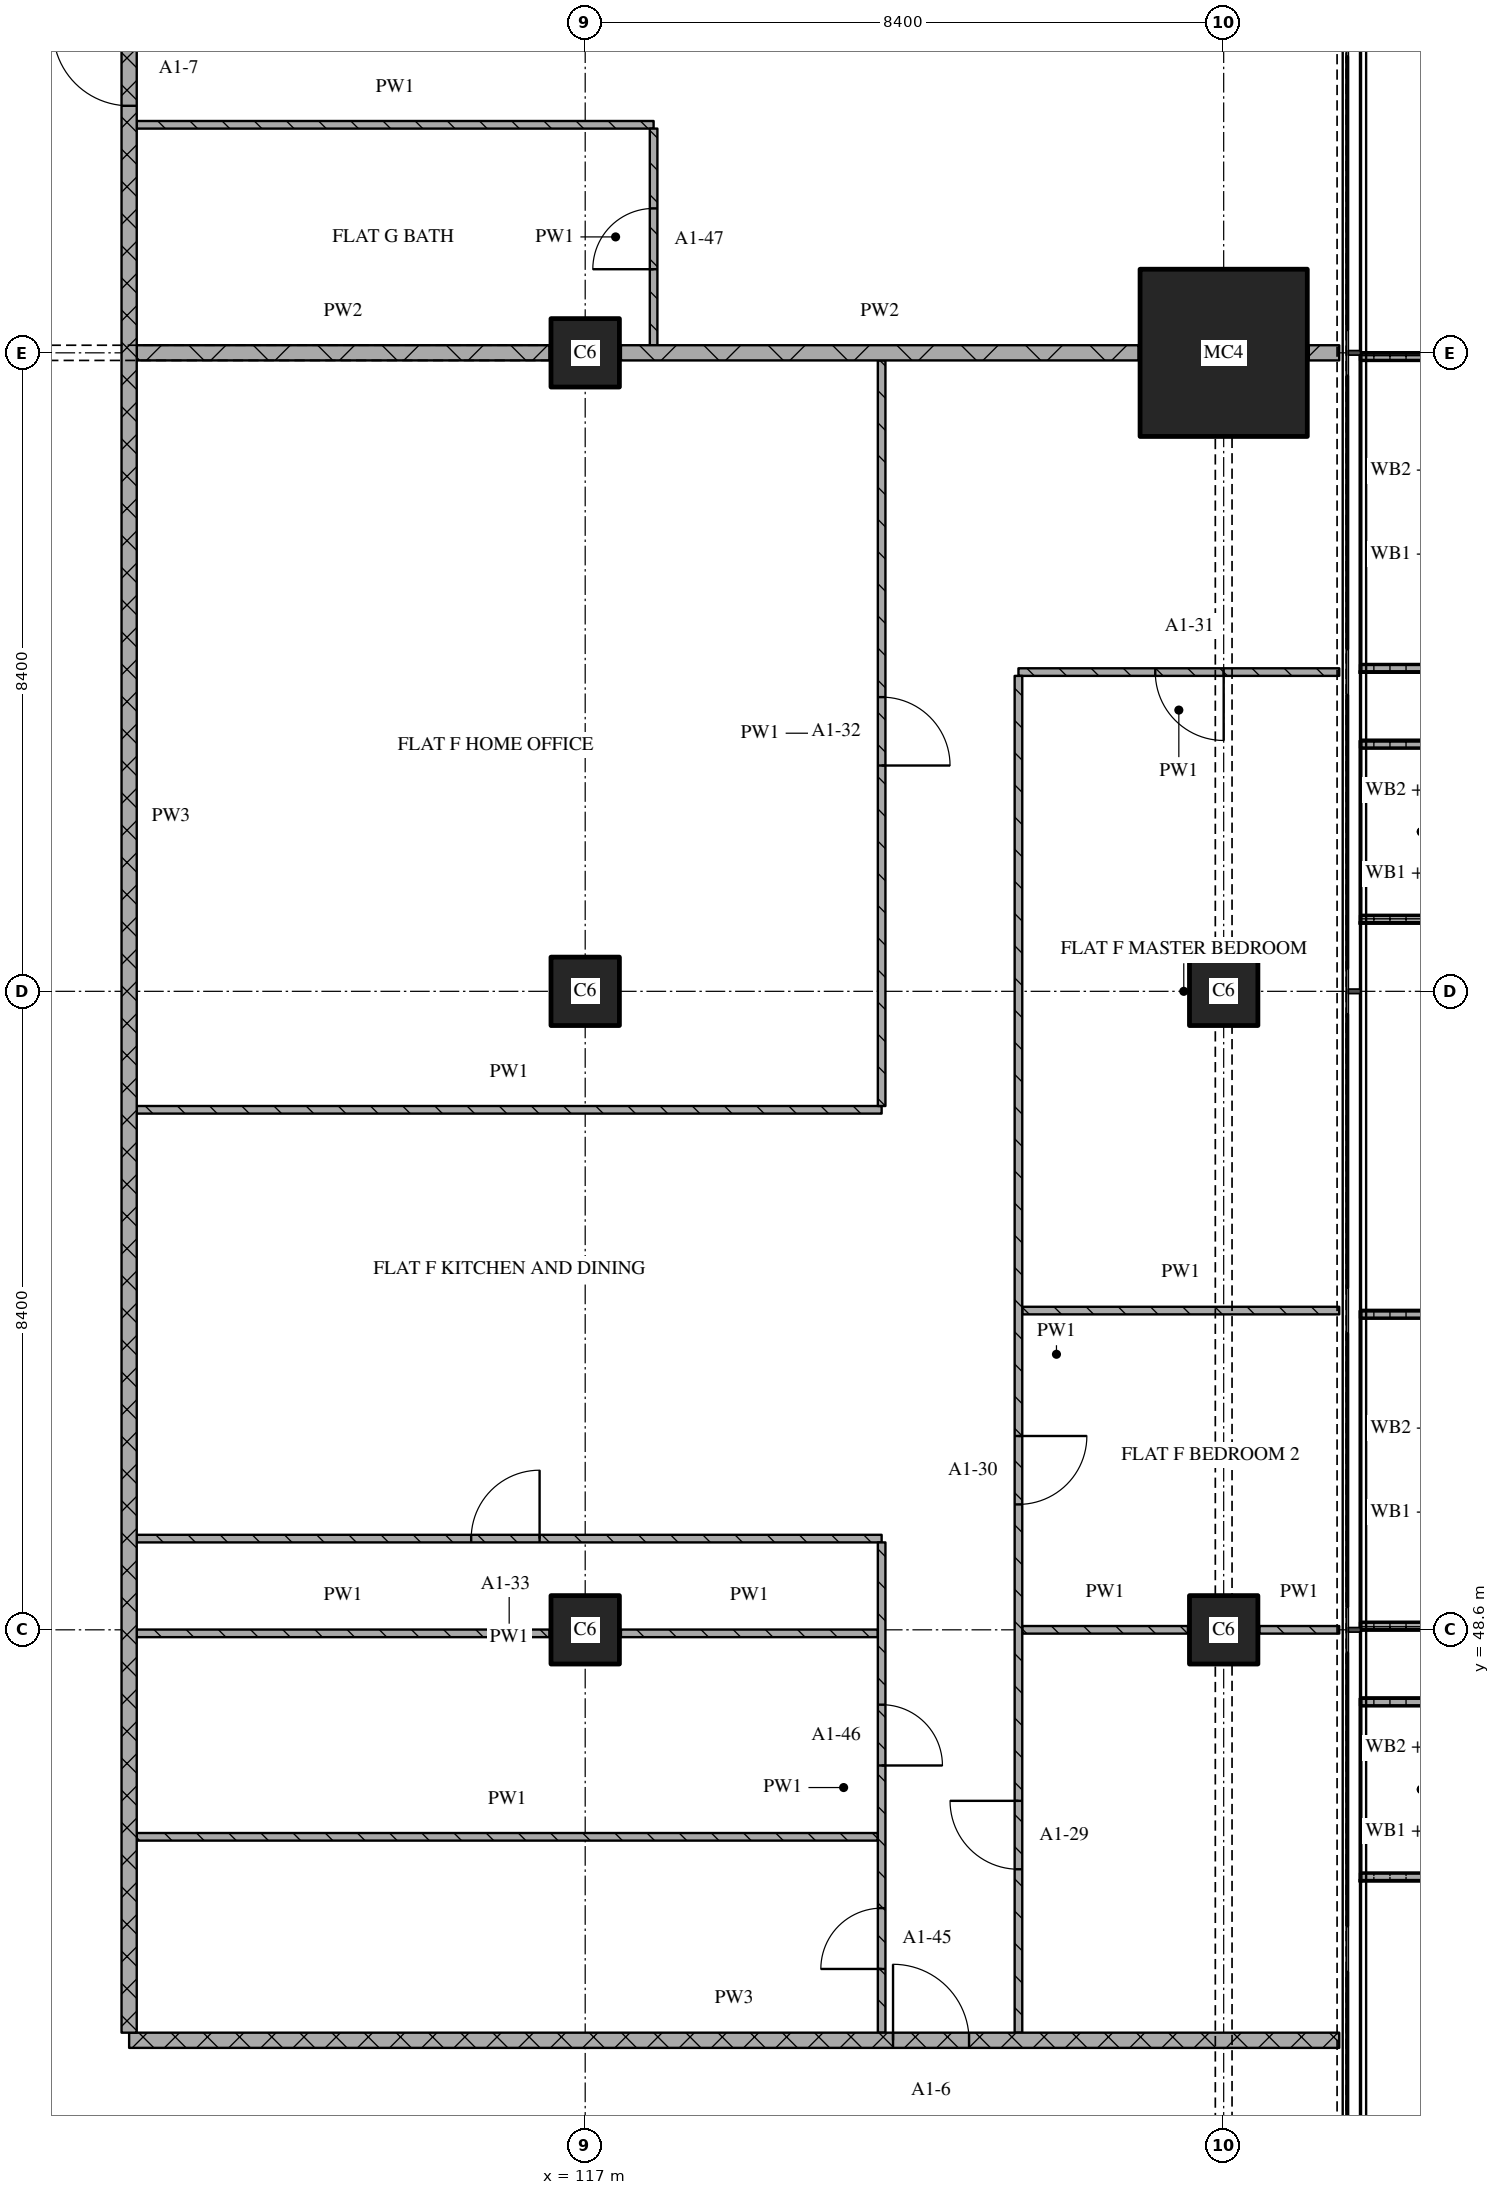
"""IFC4 building model, lengths in metres.
Left out: names, types, materials, properties, quantities, classifications, styles, units other than length and angle.
Written with IfcOpenShell. Run it as: python <this file> out.ifc"""

import sys

from ifc_helpers import new_model, si_unit, direction, frame, frame_2d, origin, origin_2d, place, context, subcontext, project, spatial, polyline, rectangle, outline, extrude, element, fill, save


model = new_model("IFC4")
c1 = context("Model", 3, precision=1e-05, world=origin(), true_north=direction((0.0, 1.0)))
c2 = subcontext(c1, "Body", "Model", "MODEL_VIEW")
j1 = project(units=[si_unit("LENGTHUNIT", "METRE"), si_unit("PLANEANGLEUNIT", "RADIAN")], contexts=[c1])
p1 = place(None, origin())
s1 = spatial("IfcSite", under=j1, at=p1, CompositionType="ELEMENT")
p2 = place(p1, origin())
s2 = spatial("IfcBuilding", under=s1, at=p2, CompositionType="ELEMENT")
p3 = place(p2, frame((0.0, 0.0, 37.2)))
s3 = spatial("IfcBuildingStorey", under=s2, at=p3, CompositionType="ELEMENT", Elevation=37.2)
for number, where, z_axis, x_axis in (
    (1, (117.0, 48.6, 0.0), (0.0, 0.0, 1.0), (1.0, 0.0, 0.0)),
    (2, (117.0, 57.0, 0.0), (0.0, 0.0, 1.0), (1.0, 0.0, 0.0)),
    (3, (117.0, 65.4, 0.0), (0.0, 0.0, 1.0), (1.0, 0.0, 0.0)),
    (4, (125.4, 48.6, 0.0), (0.0, 0.0, 1.0), (1.0, 0.0, 0.0)),
    (5, (125.4, 57.0, 0.0), (0.0, 0.0, 1.0), (1.0, 0.0, 0.0)),
):
    element("IfcColumn", number, at=place(p3, frame(where, z_axis=z_axis, x_axis=x_axis)), inside=s3, PredefinedType="COLUMN", context=c2, shape_type="SweptSolid", body=[
        extrude(rectangle(XDim=0.9, YDim=0.9, at=origin_2d()), origin(), (0.0, 0.0, 1.0), 3.6),
    ])
p4 = place(p3, frame((125.4, 65.4, 0.0), z_axis=(0.0, 0.0, 1.0), x_axis=(1.0, 0.0, 0.0)))
e6 = element("IfcColumn", 6, at=p4, inside=s3, PredefinedType="COLUMN", context=c2, shape_type="SweptSolid", body=[
    extrude(rectangle(XDim=2.2, YDim=2.2, at=origin_2d()), origin(), (0.0, 0.0, 1.0), 3.6),
])
p5 = place(p3, origin())
e7 = element("IfcWall", 7, at=p5, inside=s3, PredefinedType="SOLIDWALL", context=c2, shape_type="SweptSolid", body=[
    extrude(outline(polyline([(127.2, 45.3), (127.2, 45.4), (128.7, 45.4), (128.7, 47.6), (127.2, 47.6), (127.2, 47.7), (128.8, 47.7), (128.8, 45.3), (127.2, 45.3)])), origin(), (0.0, 0.0, 1.0), 1.0),
])
p6 = place(p3, origin())
e8 = element("IfcWall", 8, at=p6, inside=s3, PredefinedType="SOLIDWALL", context=c2, shape_type="SweptSolid", body=[
    extrude(outline(polyline([(127.2, 48.6), (127.2, 48.7), (128.833, 48.7), (128.833, 52.7), (127.2, 52.7), (127.2, 52.8), (128.933, 52.8), (128.933, 48.6), (127.2, 48.6)])), origin(), (0.0, 0.0, 1.0), 1.0),
])
p7 = place(p3, origin())
e9 = element("IfcWall", 9, at=p7, inside=s3, PredefinedType="SOLIDWALL", context=c2, shape_type="SweptSolid", body=[
    extrude(outline(polyline([(127.2, 57.9), (127.2, 58.0), (128.7, 58.0), (128.7, 60.2), (127.2, 60.2), (127.2, 60.3), (128.8, 60.3), (128.8, 57.9), (127.2, 57.9)])), origin(), (0.0, 0.0, 1.0), 1.0),
])
p8 = place(p3, origin())
e10 = element("IfcWall", 10, at=p8, inside=s3, PredefinedType="SOLIDWALL", context=c2, shape_type="SweptSolid", body=[
    extrude(outline(polyline([(127.2, 61.2), (127.2, 61.3), (128.833, 61.3), (128.833, 65.3), (127.2, 65.3), (127.2, 65.4), (128.933, 65.4), (128.933, 61.2), (127.2, 61.2)])), origin(), (0.0, 0.0, 1.0), 1.0),
])
p9 = place(p3, frame((111.0, 43.2, 0.0), z_axis=(0.0, 0.0, 1.0), x_axis=(1.0, 0.0, 0.0)))
e11 = element("IfcWall", 11, at=p9, inside=s3, PredefinedType="PARTITIONING", context=c2, shape_type="SweptSolid", body=[
    extrude(rectangle(XDim=15.92, YDim=0.2, at=frame_2d((7.96, 0.0))), origin(), (0.0, 0.0, 1.0), 3.32),
])
p10 = place(p9, frame((10.05, 0.0, 0.0)))
e12 = element("IfcOpeningElement", 12, at=p10, cuts=e11, PredefinedType="OPENING", context=c2, shape_type="SweptSolid", body=[
    extrude(rectangle(XDim=1.0, YDim=2.1, at=frame_2d((0.5, 1.05))), frame((0.0, 0.11, 0.0), z_axis=(0.0, -1.0, 0.0), x_axis=(1.0, 0.0, 0.0)), (0.0, 0.0, 1.0), 0.22),
])
p11 = place(p3, frame((111.1, 45.877, 0.0), z_axis=(0.0, 0.0, 1.0), x_axis=(1.0, 0.0, 0.0)))
e13 = element("IfcWall", 13, at=p11, inside=s3, PredefinedType="PARTITIONING", context=c2, shape_type="SweptSolid", body=[
    extrude(rectangle(XDim=9.75, YDim=0.1, at=frame_2d((4.875, 0.0))), origin(), (0.0, 0.0, 1.0), 3.32),
])
p12 = place(p3, frame((111.1, 48.553, 0.0), z_axis=(0.0, 0.0, 1.0), x_axis=(1.0, 0.0, 0.0)))
e14 = element("IfcWall", 14, at=p12, inside=s3, PredefinedType="PARTITIONING", context=c2, shape_type="SweptSolid", body=[
    extrude(rectangle(XDim=5.43, YDim=0.1, at=frame_2d((2.715, 0.0))), origin(), (0.0, 0.0, 1.0), 3.32),
])
p13 = place(p3, frame((117.47, 48.553, 0.0), z_axis=(0.0, 0.0, 1.0), x_axis=(1.0, 0.0, 0.0)))
e15 = element("IfcWall", 15, at=p13, inside=s3, PredefinedType="PARTITIONING", context=c2, shape_type="SweptSolid", body=[
    extrude(rectangle(XDim=3.38, YDim=0.1, at=frame_2d((1.69, 0.0))), origin(), (0.0, 0.0, 1.0), 3.32),
])
p14 = place(p3, frame((122.75, 48.6, 0.0), z_axis=(0.0, 0.0, 1.0), x_axis=(1.0, 0.0, 0.0)))
e16 = element("IfcWall", 16, at=p14, inside=s3, PredefinedType="PARTITIONING", context=c2, shape_type="SweptSolid", body=[
    extrude(rectangle(XDim=2.18, YDim=0.1, at=frame_2d((1.09, 0.0))), origin(), (0.0, 0.0, 1.0), 3.32),
])
p15 = place(p3, frame((125.87, 48.6, 0.0), z_axis=(0.0, 0.0, 1.0), x_axis=(1.0, 0.0, 0.0)))
e17 = element("IfcWall", 17, at=p15, inside=s3, PredefinedType="PARTITIONING", context=c2, shape_type="SweptSolid", body=[
    extrude(rectangle(XDim=1.05, YDim=0.1, at=frame_2d((0.525, 0.0))), origin(), (0.0, 0.0, 1.0), 3.32),
])
p16 = place(p3, frame((120.9, 49.8, 0.0), z_axis=(0.0, 0.0, 1.0), x_axis=(-1.0, 0.0, 0.0)))
e18 = element("IfcWall", 18, at=p16, inside=s3, PredefinedType="PARTITIONING", context=c2, shape_type="SweptSolid", body=[
    extrude(rectangle(XDim=9.8, YDim=0.1, at=frame_2d((4.9, 0.0))), origin(), (0.0, 0.0, 1.0), 3.32),
])
p17 = place(p16, frame((4.5, 0.0, 0.0)))
e19 = element("IfcOpeningElement", 19, at=p17, cuts=e18, PredefinedType="OPENING", context=c2, shape_type="SweptSolid", body=[
    extrude(rectangle(XDim=0.9, YDim=2.1, at=frame_2d((0.45, 1.05))), frame((0.0, 0.06, 0.0), z_axis=(0.0, -1.0, 0.0), x_axis=(1.0, 0.0, 0.0)), (0.0, 0.0, 1.0), 0.12),
])
p18 = place(p3, frame((122.75, 52.8, 0.0), z_axis=(0.0, 0.0, 1.0), x_axis=(1.0, 0.0, 0.0)))
e20 = element("IfcWall", 20, at=p18, inside=s3, PredefinedType="PARTITIONING", context=c2, shape_type="SweptSolid", body=[
    extrude(rectangle(XDim=4.17, YDim=0.1, at=frame_2d((2.085, 0.0))), origin(), (0.0, 0.0, 1.0), 3.32),
])
p19 = place(p3, frame((111.1, 55.441, 0.0), z_axis=(0.0, 0.0, 1.0), x_axis=(1.0, 0.0, 0.0)))
e21 = element("IfcWall", 21, at=p19, inside=s3, PredefinedType="PARTITIONING", context=c2, shape_type="SweptSolid", body=[
    extrude(rectangle(XDim=9.8, YDim=0.1, at=frame_2d((4.9, 0.0))), origin(), (0.0, 0.0, 1.0), 3.32),
])
p20 = place(p3, frame((126.92, 61.2, 0.0), z_axis=(0.0, 0.0, 1.0), x_axis=(-1.0, 0.0, 0.0)))
e22 = element("IfcWall", 22, at=p20, inside=s3, PredefinedType="PARTITIONING", context=c2, shape_type="SweptSolid", body=[
    extrude(rectangle(XDim=4.22, YDim=0.1, at=frame_2d((2.11, 0.0))), origin(), (0.0, 0.0, 1.0), 3.32),
])
p21 = place(p20, frame((1.52, 0.0, 0.0)))
e23 = element("IfcOpeningElement", 23, at=p21, cuts=e22, PredefinedType="OPENING", context=c2, shape_type="SweptSolid", body=[
    extrude(rectangle(XDim=0.9, YDim=2.1, at=frame_2d((0.45, 1.05))), frame((0.0, 0.06, 0.0), z_axis=(0.0, -1.0, 0.0), x_axis=(1.0, 0.0, 0.0)), (0.0, 0.0, 1.0), 0.12),
])
p22 = place(p3, frame((111.1, 65.4, 0.0), z_axis=(0.0, 0.0, 1.0), x_axis=(1.0, 0.0, 0.0)))
e24 = element("IfcWall", 24, at=p22, inside=s3, PredefinedType="PARTITIONING", context=c2, shape_type="SweptSolid", body=[
    extrude(rectangle(XDim=5.43, YDim=0.2, at=frame_2d((2.715, 0.0))), origin(), (0.0, 0.0, 1.0), 2.82),
])
p23 = place(p3, frame((117.47, 65.4, 0.0), z_axis=(0.0, 0.0, 1.0), x_axis=(1.0, 0.0, 0.0)))
e25 = element("IfcWall", 25, at=p23, inside=s3, PredefinedType="PARTITIONING", context=c2, shape_type="SweptSolid", body=[
    extrude(rectangle(XDim=6.81, YDim=0.2, at=frame_2d((3.405, 0.0))), origin(), (0.0, 0.0, 1.0), 3.32),
])
p24 = place(p3, frame((126.52, 65.4, 0.0), z_axis=(0.0, 0.0, 1.0), x_axis=(1.0, 0.0, 0.0)))
e26 = element("IfcWall", 26, at=p24, inside=s3, PredefinedType="PARTITIONING", context=c2, shape_type="SweptSolid", body=[
    extrude(rectangle(XDim=0.4, YDim=0.2, at=frame_2d((0.2, 0.0))), origin(), (0.0, 0.0, 1.0), 3.32),
])
p25 = place(p3, frame((111.1, 68.4, 0.0), z_axis=(0.0, 0.0, 1.0), x_axis=(1.0, 0.0, 0.0)))
e27 = element("IfcWall", 27, at=p25, inside=s3, PredefinedType="PARTITIONING", context=c2, shape_type="SweptSolid", body=[
    extrude(rectangle(XDim=6.8, YDim=0.1, at=frame_2d((3.4, 0.0))), origin(), (0.0, 0.0, 1.0), 3.32),
])
p26 = place(p3, frame((111.0, 75.32, 0.0), z_axis=(0.0, 0.0, 1.0), x_axis=(0.0, -1.0, 0.0)))
e28 = element("IfcWall", 28, at=p26, inside=s3, PredefinedType="PARTITIONING", context=c2, shape_type="SweptSolid", body=[
    extrude(rectangle(XDim=32.02, YDim=0.2, at=frame_2d((16.01, 0.0))), origin(), (0.0, 0.0, 1.0), 3.32),
])
p27 = place(p26, frame((5.67, 0.0, 0.0)))
e29 = element("IfcOpeningElement", 29, at=p27, cuts=e28, PredefinedType="OPENING", context=c2, shape_type="SweptSolid", body=[
    extrude(rectangle(XDim=1.0, YDim=2.1, at=frame_2d((0.5, 1.05))), frame((0.0, 0.11, 0.0), z_axis=(0.0, -1.0, 0.0), x_axis=(1.0, 0.0, 0.0)), (0.0, 0.0, 1.0), 0.22),
])
p28 = place(p3, frame((117.9, 65.5, 0.0), z_axis=(0.0, 0.0, 1.0), x_axis=(0.0, 1.0, 0.0)))
e30 = element("IfcWall", 30, at=p28, inside=s3, PredefinedType="PARTITIONING", context=c2, shape_type="SweptSolid", body=[
    extrude(rectangle(XDim=2.85, YDim=0.1, at=frame_2d((1.425, 0.0))), origin(), (0.0, 0.0, 1.0), 3.32),
])
p29 = place(p28, frame((1.0, 0.0, 0.0)))
e31 = element("IfcOpeningElement", 31, at=p29, cuts=e30, PredefinedType="OPENING", context=c2, shape_type="SweptSolid", body=[
    extrude(rectangle(XDim=0.8, YDim=2.1, at=frame_2d((0.4, 1.05))), frame((0.0, 0.06, 0.0), z_axis=(0.0, -1.0, 0.0), x_axis=(1.0, 0.0, 0.0)), (0.0, 0.0, 1.0), 0.12),
])
p30 = place(p3, frame((120.9, 43.3, 0.0), z_axis=(0.0, 0.0, 1.0), x_axis=(0.0, 1.0, 0.0)))
e32 = element("IfcWall", 32, at=p30, inside=s3, PredefinedType="PARTITIONING", context=c2, shape_type="SweptSolid", body=[
    extrude(rectangle(XDim=6.45, YDim=0.1, at=frame_2d((3.225, 0.0))), origin(), (0.0, 0.0, 1.0), 3.32),
])
p31 = place(p30, frame((0.838, 0.0, 0.0)))
e33 = element("IfcOpeningElement", 33, at=p31, cuts=e32, PredefinedType="OPENING", context=c2, shape_type="SweptSolid", body=[
    extrude(rectangle(XDim=0.8, YDim=2.1, at=frame_2d((0.4, 1.05))), frame((0.0, 0.06, 0.0), z_axis=(0.0, -1.0, 0.0), x_axis=(1.0, 0.0, 0.0)), (0.0, 0.0, 1.0), 0.12),
])
p32 = place(p30, frame((3.515, 0.0, 0.0)))
e34 = element("IfcOpeningElement", 34, at=p32, cuts=e32, PredefinedType="OPENING", context=c2, shape_type="SweptSolid", body=[
    extrude(rectangle(XDim=0.8, YDim=2.1, at=frame_2d((0.4, 1.05))), frame((0.0, 0.06, 0.0), z_axis=(0.0, -1.0, 0.0), x_axis=(1.0, 0.0, 0.0)), (0.0, 0.0, 1.0), 0.12),
])
p33 = place(p3, frame((120.9, 55.491, 0.0), z_axis=(0.0, 0.0, 1.0), x_axis=(0.0, 1.0, 0.0)))
e35 = element("IfcWall", 35, at=p33, inside=s3, PredefinedType="PARTITIONING", context=c2, shape_type="SweptSolid", body=[
    extrude(rectangle(XDim=9.809, YDim=0.1, at=frame_2d((4.904, 0.0))), origin(), (0.0, 0.0, 1.0), 3.32),
])
p34 = place(p33, frame((4.479, 0.0, 0.0)))
e36 = element("IfcOpeningElement", 36, at=p34, cuts=e35, PredefinedType="OPENING", context=c2, shape_type="SweptSolid", body=[
    extrude(rectangle(XDim=0.9, YDim=2.1, at=frame_2d((0.45, 1.05))), frame((0.0, 0.06, 0.0), z_axis=(0.0, -1.0, 0.0), x_axis=(1.0, 0.0, 0.0)), (0.0, 0.0, 1.0), 0.12),
])
p35 = place(p3, frame((122.7, 61.15, 0.0), z_axis=(0.0, 0.0, 1.0), x_axis=(0.0, -1.0, 0.0)))
e37 = element("IfcWall", 37, at=p35, inside=s3, PredefinedType="PARTITIONING", context=c2, shape_type="SweptSolid", body=[
    extrude(rectangle(XDim=17.85, YDim=0.1, at=frame_2d((8.925, 0.0))), origin(), (0.0, 0.0, 1.0), 3.32),
])
p36 = place(p35, frame((10.0, 0.0, 0.0)))
e38 = element("IfcOpeningElement", 38, at=p36, cuts=e37, PredefinedType="OPENING", context=c2, shape_type="SweptSolid", body=[
    extrude(rectangle(XDim=0.9, YDim=2.1, at=frame_2d((0.45, 1.05))), frame((0.0, 0.06, 0.0), z_axis=(0.0, -1.0, 0.0), x_axis=(1.0, 0.0, 0.0)), (0.0, 0.0, 1.0), 0.12),
])
p37 = place(p35, frame((14.8, 0.0, 0.0)))
e39 = element("IfcOpeningElement", 39, at=p37, cuts=e37, PredefinedType="OPENING", context=c2, shape_type="SweptSolid", body=[
    extrude(rectangle(XDim=0.9, YDim=2.1, at=frame_2d((0.45, 1.05))), frame((0.0, 0.06, 0.0), z_axis=(0.0, -1.0, 0.0), x_axis=(1.0, 0.0, 0.0)), (0.0, 0.0, 1.0), 0.12),
])
p38 = place(p10, origin())
e40 = element("IfcDoor", 40, at=p38, inside=s3, OperationType="SINGLE_SWING_LEFT", PredefinedType="DOOR", context=c2, shape_type="SweptSolid", body=[
    extrude(rectangle(XDim=1.0, YDim=2.1, at=frame_2d((0.5, 1.05))), frame((0.0, 0.025, 0.0), z_axis=(0.0, -1.0, 0.0), x_axis=(1.0, 0.0, 0.0)), (0.0, 0.0, 1.0), 0.05),
])
fill(e12, e40)
p39 = place(p17, origin())
e41 = element("IfcDoor", 41, at=p39, inside=s3, OperationType="SINGLE_SWING_RIGHT", PredefinedType="DOOR", context=c2, shape_type="SweptSolid", body=[
    extrude(rectangle(XDim=0.9, YDim=2.1, at=frame_2d((0.45, 1.05))), frame((0.0, 0.025, 0.0), z_axis=(0.0, -1.0, 0.0), x_axis=(1.0, 0.0, 0.0)), (0.0, 0.0, 1.0), 0.05),
])
fill(e19, e41)
p40 = place(p21, origin())
e42 = element("IfcDoor", 42, at=p40, inside=s3, OperationType="SINGLE_SWING_LEFT", PredefinedType="DOOR", context=c2, shape_type="SweptSolid", body=[
    extrude(rectangle(XDim=0.9, YDim=2.1, at=frame_2d((0.45, 1.05))), frame((0.0, 0.025, 0.0), z_axis=(0.0, -1.0, 0.0), x_axis=(1.0, 0.0, 0.0)), (0.0, 0.0, 1.0), 0.05),
])
fill(e23, e42)
p41 = place(p27, origin())
e43 = element("IfcDoor", 43, at=p41, inside=s3, OperationType="SINGLE_SWING_RIGHT", PredefinedType="DOOR", context=c2, shape_type="SweptSolid", body=[
    extrude(rectangle(XDim=1.0, YDim=2.1, at=frame_2d((0.5, 1.05))), frame((0.0, 0.025, 0.0), z_axis=(0.0, -1.0, 0.0), x_axis=(1.0, 0.0, 0.0)), (0.0, 0.0, 1.0), 0.05),
])
fill(e29, e43)
p42 = place(p29, origin())
e44 = element("IfcDoor", 44, at=p42, inside=s3, OperationType="SINGLE_SWING_LEFT", PredefinedType="DOOR", context=c2, shape_type="SweptSolid", body=[
    extrude(rectangle(XDim=0.8, YDim=2.1, at=frame_2d((0.4, 1.05))), frame((0.0, 0.025, 0.0), z_axis=(0.0, -1.0, 0.0), x_axis=(1.0, 0.0, 0.0)), (0.0, 0.0, 1.0), 0.05),
])
fill(e31, e44)
p43 = place(p31, origin())
e45 = element("IfcDoor", 45, at=p43, inside=s3, OperationType="SINGLE_SWING_LEFT", PredefinedType="DOOR", context=c2, shape_type="SweptSolid", body=[
    extrude(rectangle(XDim=0.8, YDim=2.1, at=frame_2d((0.4, 1.05))), frame((0.0, 0.025, 0.0), z_axis=(0.0, -1.0, 0.0), x_axis=(1.0, 0.0, 0.0)), (0.0, 0.0, 1.0), 0.05),
])
fill(e33, e45)
p44 = place(p32, origin())
e46 = element("IfcDoor", 46, at=p44, inside=s3, OperationType="SINGLE_SWING_RIGHT", PredefinedType="DOOR", context=c2, shape_type="SweptSolid", body=[
    extrude(rectangle(XDim=0.8, YDim=2.1, at=frame_2d((0.4, 1.05))), frame((0.0, 0.025, 0.0), z_axis=(0.0, -1.0, 0.0), x_axis=(1.0, 0.0, 0.0)), (0.0, 0.0, 1.0), 0.05),
])
fill(e34, e46)
p45 = place(p34, origin())
e47 = element("IfcDoor", 47, at=p45, inside=s3, OperationType="SINGLE_SWING_RIGHT", PredefinedType="DOOR", context=c2, shape_type="SweptSolid", body=[
    extrude(rectangle(XDim=0.9, YDim=2.1, at=frame_2d((0.45, 1.05))), frame((0.0, 0.025, 0.0), z_axis=(0.0, -1.0, 0.0), x_axis=(1.0, 0.0, 0.0)), (0.0, 0.0, 1.0), 0.05),
])
fill(e36, e47)
p46 = place(p36, origin())
e48 = element("IfcDoor", 48, at=p46, inside=s3, OperationType="SINGLE_SWING_LEFT", PredefinedType="DOOR", context=c2, shape_type="SweptSolid", body=[
    extrude(rectangle(XDim=0.9, YDim=2.1, at=frame_2d((0.45, 1.05))), frame((0.0, 0.025, 0.0), z_axis=(0.0, -1.0, 0.0), x_axis=(1.0, 0.0, 0.0)), (0.0, 0.0, 1.0), 0.05),
])
fill(e38, e48)
p47 = place(p37, origin())
e49 = element("IfcDoor", 49, at=p47, inside=s3, OperationType="SINGLE_SWING_RIGHT", PredefinedType="DOOR", context=c2, shape_type="SweptSolid", body=[
    extrude(rectangle(XDim=0.9, YDim=2.1, at=frame_2d((0.45, 1.05))), frame((0.0, 0.025, 0.0), z_axis=(0.0, -1.0, 0.0), x_axis=(1.0, 0.0, 0.0)), (0.0, 0.0, 1.0), 0.05),
])
fill(e39, e49)
save(model, sys.argv[1])
